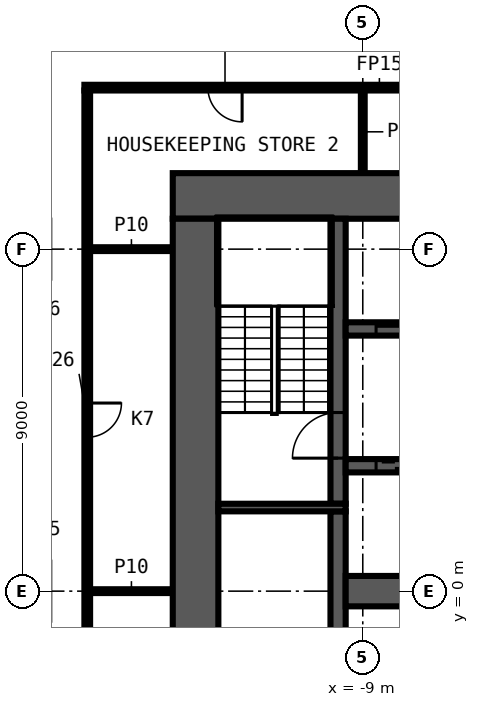
"""IFC4 building model, lengths in metres.
Left out: names, types, materials, properties, quantities, classifications, styles, units other than length and angle.
Written with IfcOpenShell. Run it as: python <this file> out.ifc"""

import sys

from ifc_helpers import new_model, si_unit, direction, frame, frame_2d, origin, place, context, subcontext, project, spatial, rectangle, extrude, element, fill, save


model = new_model("IFC4")
c1 = context("Model", 3, precision=1e-05, world=origin(), true_north=direction((0.0, 1.0)))
c2 = subcontext(c1, "Body", "Model", "MODEL_VIEW")
j1 = project(units=[si_unit("LENGTHUNIT", "METRE"), si_unit("PLANEANGLEUNIT", "RADIAN")], contexts=[c1])
p1 = place(None, origin())
s1 = spatial("IfcSite", under=j1, at=p1, CompositionType="ELEMENT")
p2 = place(p1, origin())
s2 = spatial("IfcBuilding", under=s1, at=p2, CompositionType="ELEMENT")
p3 = place(p2, frame((0.0, 0.0, 44.0)))
s3 = spatial("IfcBuildingStorey", under=s2, at=p3, CompositionType="ELEMENT", Elevation=44.0)
for number, where, z_axis, x_axis in (
    (1, (-16.175, 0.0, 0.0), (0.0, 0.0, 1.0), (1.0, 0.0, 0.0)),
    (2, (-16.175, 9.0, 0.0), (0.0, 0.0, 1.0), (1.0, 0.0, 0.0)),
):
    element("IfcWall", number, at=place(p3, frame(where, z_axis=z_axis, x_axis=x_axis)), inside=s3, PredefinedType="PARTITIONING", context=c2, shape_type="SweptSolid", body=[
        extrude(rectangle(XDim=2.175, YDim=0.1, at=frame_2d((1.087, 0.0))), origin(), (0.0, 0.0, 1.0), 3.3),
    ])
p4 = place(p3, frame((1.425, 13.25, 0.0), z_axis=(0.0, 0.0, 1.0), x_axis=(-1.0, 0.0, 0.0)))
e3 = element("IfcWall", 3, at=p4, inside=s3, PredefinedType="PARTITIONING", context=c2, shape_type="SweptSolid", body=[
    extrude(rectangle(XDim=17.75, YDim=0.15, at=frame_2d((8.875, 0.0))), origin(), (0.0, 0.0, 1.0), 3.3),
])
p5 = place(p4, frame((5.475, 0.0, 0.0)))
e4 = element("IfcOpeningElement", 4, at=p5, cuts=e3, PredefinedType="OPENING", context=c2, shape_type="SweptSolid", body=[
    extrude(rectangle(XDim=0.9, YDim=2.1, at=frame_2d((0.45, 1.05))), frame((0.0, 0.085, 0.0), z_axis=(0.0, -1.0, 0.0), x_axis=(1.0, 0.0, 0.0)), (0.0, 0.0, 1.0), 0.17),
])
p6 = place(p4, frame((13.6, 0.0, 0.0)))
e5 = element("IfcOpeningElement", 5, at=p6, cuts=e3, PredefinedType="OPENING", context=c2, shape_type="SweptSolid", body=[
    extrude(rectangle(XDim=0.9, YDim=2.1, at=frame_2d((0.45, 1.05))), frame((0.0, 0.085, 0.0), z_axis=(0.0, -1.0, 0.0), x_axis=(1.0, 0.0, 0.0)), (0.0, 0.0, 1.0), 0.17),
])
p7 = place(p3, frame((-9.0, 11.0, 0.0), z_axis=(0.0, 0.0, 1.0), x_axis=(0.0, 1.0, 0.0)))
e6 = element("IfcWall", 6, at=p7, inside=s3, PredefinedType="PARTITIONING", context=c2, shape_type="SweptSolid", body=[
    extrude(rectangle(XDim=2.175, YDim=0.1, at=frame_2d((1.087, 0.0))), origin(), (0.0, 0.0, 1.0), 3.3),
])
p8 = place(p3, frame((-16.25, 13.175, 0.0), z_axis=(0.0, 0.0, 1.0), x_axis=(0.0, -1.0, 0.0)))
e7 = element("IfcWall", 7, at=p8, inside=s3, PredefinedType="PARTITIONING", context=c2, shape_type="SweptSolid", body=[
    extrude(rectangle(XDim=26.35, YDim=0.15, at=frame_2d((13.175, 0.0))), origin(), (0.0, 0.0, 1.0), 3.3),
])
p9 = place(p8, frame((17.225, 0.0, 0.0)))
e8 = element("IfcOpeningElement", 8, at=p9, cuts=e7, PredefinedType="OPENING", context=c2, shape_type="SweptSolid", body=[
    extrude(rectangle(XDim=0.9, YDim=2.1, at=frame_2d((0.45, 1.05))), frame((0.0, 0.085, 0.0), z_axis=(0.0, -1.0, 0.0), x_axis=(1.0, 0.0, 0.0)), (0.0, 0.0, 1.0), 0.17),
])
p10 = place(p8, frame((8.225, 0.0, 0.0)))
e9 = element("IfcOpeningElement", 9, at=p10, cuts=e7, PredefinedType="OPENING", context=c2, shape_type="SweptSolid", body=[
    extrude(rectangle(XDim=0.9, YDim=2.1, at=frame_2d((0.45, 1.05))), frame((0.0, 0.085, 0.0), z_axis=(0.0, -1.0, 0.0), x_axis=(1.0, 0.0, 0.0)), (0.0, 0.0, 1.0), 0.17),
])
p11 = place(p3, frame((-14.0, 10.4, 0.0), z_axis=(0.0, 0.0, 1.0), x_axis=(1.0, 0.0, 0.0)))
e10 = element("IfcWall", 10, at=p11, inside=s3, PredefinedType="SHEAR", context=c2, shape_type="SweptSolid", body=[
    extrude(rectangle(XDim=28.0, YDim=1.2, at=frame_2d((14.0, 0.0))), origin(), (0.0, 0.0, 1.0), 3.3),
])
p12 = place(p11, frame((15.9, 0.0, 0.0)))
e11 = element("IfcOpeningElement", 11, at=p12, cuts=e10, PredefinedType="OPENING", context=c2, shape_type="SweptSolid", body=[
    extrude(rectangle(XDim=1.6, YDim=2.1, at=frame_2d((0.8, 1.05))), frame((0.0, 0.61, 0.0), z_axis=(0.0, -1.0, 0.0), x_axis=(1.0, 0.0, 0.0)), (0.0, 0.0, 1.0), 1.22),
])
p13 = place(p3, frame((-13.4, -9.8, 0.0), z_axis=(0.0, 0.0, 1.0), x_axis=(0.0, 1.0, 0.0)))
e12 = element("IfcWall", 12, at=p13, inside=s3, PredefinedType="SHEAR", context=c2, shape_type="SweptSolid", body=[
    extrude(rectangle(XDim=19.6, YDim=1.2, at=frame_2d((9.8, 0.0))), origin(), (0.0, 0.0, 1.0), 3.3),
])
p14 = place(p3, frame((-9.65, -2.1, 0.0), z_axis=(0.0, 0.0, 1.0), x_axis=(0.0, 1.0, 0.0)))
e13 = element("IfcWall", 13, at=p14, inside=s3, PredefinedType="SHEAR", context=c2, shape_type="SweptSolid", body=[
    extrude(rectangle(XDim=4.2, YDim=0.4, at=frame_2d((2.1, 0.0))), origin(), (0.0, 0.0, 1.0), 3.3),
])
p15 = place(p3, frame((-9.65, 2.3, 0.0), z_axis=(0.0, 0.0, 1.0), x_axis=(0.0, 1.0, 0.0)))
e14 = element("IfcWall", 14, at=p15, inside=s3, PredefinedType="SHEAR", context=c2, shape_type="SweptSolid", body=[
    extrude(rectangle(XDim=7.5, YDim=0.4, at=frame_2d((3.75, 0.0))), origin(), (0.0, 0.0, 1.0), 3.3),
])
p16 = place(p15, frame((1.2, 0.0, 0.0)))
e15 = element("IfcOpeningElement", 15, at=p16, cuts=e14, PredefinedType="OPENING", context=c2, shape_type="SweptSolid", body=[
    extrude(rectangle(XDim=1.2, YDim=2.1, at=frame_2d((0.6, 1.05))), frame((0.0, 0.21, 0.0), z_axis=(0.0, -1.0, 0.0), x_axis=(1.0, 0.0, 0.0)), (0.0, 0.0, 1.0), 0.42),
])
p17 = place(p3, frame((-9.45, 2.2, 0.0), z_axis=(0.0, 0.0, 1.0), x_axis=(-1.0, 0.0, 0.0)))
e16 = element("IfcWall", 16, at=p17, inside=s3, PredefinedType="SHEAR", context=c2, shape_type="SweptSolid", body=[
    extrude(rectangle(XDim=3.35, YDim=0.2, at=frame_2d((1.675, 0.0))), origin(), (0.0, 0.0, 1.0), 3.3),
])
p18 = place(p3, frame((-9.45, 6.9, 0.0), z_axis=(0.0, 0.0, 1.0), x_axis=(1.0, 0.0, 0.0)))
e17 = element("IfcWall", 17, at=p18, inside=s3, PredefinedType="SHEAR", context=c2, shape_type="SweptSolid", body=[
    extrude(rectangle(XDim=18.9, YDim=0.35, at=frame_2d((9.45, 0.0))), origin(), (0.0, 0.0, 1.0), 3.3),
])
p19 = place(p18, frame((0.8, 0.0, 0.0)))
e18 = element("IfcOpeningElement", 18, at=p19, cuts=e17, PredefinedType="OPENING", context=c2, shape_type="SweptSolid", body=[
    extrude(rectangle(XDim=1.1, YDim=2.1, at=frame_2d((0.55, 1.05))), frame((0.0, 0.185, 0.0), z_axis=(0.0, -1.0, 0.0), x_axis=(1.0, 0.0, 0.0)), (0.0, 0.0, 1.0), 0.37),
])
p20 = place(p18, frame((3.5, 0.0, 0.0)))
e19 = element("IfcOpeningElement", 19, at=p20, cuts=e17, PredefinedType="OPENING", context=c2, shape_type="SweptSolid", body=[
    extrude(rectangle(XDim=1.1, YDim=2.1, at=frame_2d((0.55, 1.05))), frame((0.0, 0.185, 0.0), z_axis=(0.0, -1.0, 0.0), x_axis=(1.0, 0.0, 0.0)), (0.0, 0.0, 1.0), 0.37),
])
p21 = place(p18, frame((6.2, 0.0, 0.0)))
e20 = element("IfcOpeningElement", 20, at=p21, cuts=e17, PredefinedType="OPENING", context=c2, shape_type="SweptSolid", body=[
    extrude(rectangle(XDim=1.1, YDim=2.1, at=frame_2d((0.55, 1.05))), frame((0.0, 0.185, 0.0), z_axis=(0.0, -1.0, 0.0), x_axis=(1.0, 0.0, 0.0)), (0.0, 0.0, 1.0), 0.37),
])
p22 = place(p18, frame((8.9, 0.0, 0.0)))
e21 = element("IfcOpeningElement", 21, at=p22, cuts=e17, PredefinedType="OPENING", context=c2, shape_type="SweptSolid", body=[
    extrude(rectangle(XDim=1.1, YDim=2.1, at=frame_2d((0.55, 1.05))), frame((0.0, 0.185, 0.0), z_axis=(0.0, -1.0, 0.0), x_axis=(1.0, 0.0, 0.0)), (0.0, 0.0, 1.0), 0.37),
])
p23 = place(p18, frame((11.55, 0.0, 0.0)))
e22 = element("IfcOpeningElement", 22, at=p23, cuts=e17, PredefinedType="OPENING", context=c2, shape_type="SweptSolid", body=[
    extrude(rectangle(XDim=1.2, YDim=2.1, at=frame_2d((0.6, 1.05))), frame((0.0, 0.185, 0.0), z_axis=(0.0, -1.0, 0.0), x_axis=(1.0, 0.0, 0.0)), (0.0, 0.0, 1.0), 0.37),
])
p24 = place(p18, frame((14.3, 0.0, 0.0)))
e23 = element("IfcOpeningElement", 23, at=p24, cuts=e17, PredefinedType="OPENING", context=c2, shape_type="SweptSolid", body=[
    extrude(rectangle(XDim=1.1, YDim=2.1, at=frame_2d((0.55, 1.05))), frame((0.0, 0.185, 0.0), z_axis=(0.0, -1.0, 0.0), x_axis=(1.0, 0.0, 0.0)), (0.0, 0.0, 1.0), 0.37),
])
p25 = place(p18, frame((17.0, 0.0, 0.0)))
e24 = element("IfcOpeningElement", 24, at=p25, cuts=e17, PredefinedType="OPENING", context=c2, shape_type="SweptSolid", body=[
    extrude(rectangle(XDim=1.1, YDim=2.1, at=frame_2d((0.55, 1.05))), frame((0.0, 0.185, 0.0), z_axis=(0.0, -1.0, 0.0), x_axis=(1.0, 0.0, 0.0)), (0.0, 0.0, 1.0), 0.37),
])
p26 = place(p3, frame((9.45, 3.3, 0.0), z_axis=(0.0, 0.0, 1.0), x_axis=(-1.0, 0.0, 0.0)))
e25 = element("IfcWall", 25, at=p26, inside=s3, PredefinedType="SHEAR", context=c2, shape_type="SweptSolid", body=[
    extrude(rectangle(XDim=18.9, YDim=0.35, at=frame_2d((9.45, 0.0))), origin(), (0.0, 0.0, 1.0), 3.3),
])
p27 = place(p26, frame((17.0, 0.0, 0.0)))
e26 = element("IfcOpeningElement", 26, at=p27, cuts=e25, PredefinedType="OPENING", context=c2, shape_type="SweptSolid", body=[
    extrude(rectangle(XDim=1.1, YDim=2.1, at=frame_2d((0.55, 1.05))), frame((0.0, 0.185, 0.0), z_axis=(0.0, -1.0, 0.0), x_axis=(1.0, 0.0, 0.0)), (0.0, 0.0, 1.0), 0.37),
])
p28 = place(p26, frame((14.3, 0.0, 0.0)))
e27 = element("IfcOpeningElement", 27, at=p28, cuts=e25, PredefinedType="OPENING", context=c2, shape_type="SweptSolid", body=[
    extrude(rectangle(XDim=1.1, YDim=2.1, at=frame_2d((0.55, 1.05))), frame((0.0, 0.185, 0.0), z_axis=(0.0, -1.0, 0.0), x_axis=(1.0, 0.0, 0.0)), (0.0, 0.0, 1.0), 0.37),
])
p29 = place(p26, frame((11.6, 0.0, 0.0)))
e28 = element("IfcOpeningElement", 28, at=p29, cuts=e25, PredefinedType="OPENING", context=c2, shape_type="SweptSolid", body=[
    extrude(rectangle(XDim=1.1, YDim=2.1, at=frame_2d((0.55, 1.05))), frame((0.0, 0.185, 0.0), z_axis=(0.0, -1.0, 0.0), x_axis=(1.0, 0.0, 0.0)), (0.0, 0.0, 1.0), 0.37),
])
p30 = place(p26, frame((8.9, 0.0, 0.0)))
e29 = element("IfcOpeningElement", 29, at=p30, cuts=e25, PredefinedType="OPENING", context=c2, shape_type="SweptSolid", body=[
    extrude(rectangle(XDim=1.1, YDim=2.1, at=frame_2d((0.55, 1.05))), frame((0.0, 0.185, 0.0), z_axis=(0.0, -1.0, 0.0), x_axis=(1.0, 0.0, 0.0)), (0.0, 0.0, 1.0), 0.37),
])
p31 = place(p26, frame((6.2, 0.0, 0.0)))
e30 = element("IfcOpeningElement", 30, at=p31, cuts=e25, PredefinedType="OPENING", context=c2, shape_type="SweptSolid", body=[
    extrude(rectangle(XDim=1.1, YDim=2.1, at=frame_2d((0.55, 1.05))), frame((0.0, 0.185, 0.0), z_axis=(0.0, -1.0, 0.0), x_axis=(1.0, 0.0, 0.0)), (0.0, 0.0, 1.0), 0.37),
])
p32 = place(p26, frame((3.5, 0.0, 0.0)))
e31 = element("IfcOpeningElement", 31, at=p32, cuts=e25, PredefinedType="OPENING", context=c2, shape_type="SweptSolid", body=[
    extrude(rectangle(XDim=1.1, YDim=2.1, at=frame_2d((0.55, 1.05))), frame((0.0, 0.185, 0.0), z_axis=(0.0, -1.0, 0.0), x_axis=(1.0, 0.0, 0.0)), (0.0, 0.0, 1.0), 0.37),
])
p33 = place(p26, frame((0.9, 0.0, 0.0)))
e32 = element("IfcOpeningElement", 32, at=p33, cuts=e25, PredefinedType="OPENING", context=c2, shape_type="SweptSolid", body=[
    extrude(rectangle(XDim=0.9, YDim=2.1, at=frame_2d((0.45, 1.05))), frame((0.0, 0.185, 0.0), z_axis=(0.0, -1.0, 0.0), x_axis=(1.0, 0.0, 0.0)), (0.0, 0.0, 1.0), 0.37),
])
p34 = place(p3, frame((-9.45, 0.0, 0.0), z_axis=(0.0, 0.0, 1.0), x_axis=(1.0, 0.0, 0.0)))
e33 = element("IfcWall", 33, at=p34, inside=s3, PredefinedType="SHEAR", context=c2, shape_type="SweptSolid", body=[
    extrude(rectangle(XDim=18.9, YDim=0.8, at=frame_2d((9.45, 0.0))), origin(), (0.0, 0.0, 1.0), 3.3),
])
p35 = place(p6, origin())
e34 = element("IfcDoor", 34, at=p35, inside=s3, OperationType="SINGLE_SWING_LEFT", PredefinedType="DOOR", context=c2, shape_type="SweptSolid", body=[
    extrude(rectangle(XDim=0.9, YDim=2.1, at=frame_2d((0.45, 1.05))), frame((0.0, 0.025, 0.0), z_axis=(0.0, -1.0, 0.0), x_axis=(1.0, 0.0, 0.0)), (0.0, 0.0, 1.0), 0.05),
])
fill(e5, e34)
p36 = place(p10, origin())
e35 = element("IfcDoor", 35, at=p36, inside=s3, OperationType="SINGLE_SWING_RIGHT", PredefinedType="DOOR", context=c2, shape_type="SweptSolid", body=[
    extrude(rectangle(XDim=0.9, YDim=2.1, at=frame_2d((0.45, 1.05))), frame((0.0, 0.025, 0.0), z_axis=(0.0, -1.0, 0.0), x_axis=(1.0, 0.0, 0.0)), (0.0, 0.0, 1.0), 0.05),
])
fill(e9, e35)
p37 = place(p19, origin())
e36 = element("IfcDoor", 36, at=p37, inside=s3, OperationType="DOUBLE_DOOR_SLIDING", PredefinedType="DOOR", context=c2, shape_type="SweptSolid", body=[
    extrude(rectangle(XDim=1.1, YDim=2.1, at=frame_2d((0.55, 1.05))), frame((0.0, 0.025, 0.0), z_axis=(0.0, -1.0, 0.0), x_axis=(1.0, 0.0, 0.0)), (0.0, 0.0, 1.0), 0.05),
])
fill(e18, e36)
p38 = place(p27, origin())
e37 = element("IfcDoor", 37, at=p38, inside=s3, OperationType="DOUBLE_DOOR_SLIDING", PredefinedType="DOOR", context=c2, shape_type="SweptSolid", body=[
    extrude(rectangle(XDim=1.1, YDim=2.1, at=frame_2d((0.55, 1.05))), frame((0.0, 0.025, 0.0), z_axis=(0.0, -1.0, 0.0), x_axis=(1.0, 0.0, 0.0)), (0.0, 0.0, 1.0), 0.05),
])
fill(e26, e37)
p39 = place(p16, origin())
e38 = element("IfcDoor", 38, at=p39, inside=s3, OperationType="SINGLE_SWING_RIGHT", PredefinedType="DOOR", context=c2, shape_type="SweptSolid", body=[
    extrude(rectangle(XDim=1.2, YDim=2.1, at=frame_2d((0.6, 1.05))), frame((0.0, 0.025, 0.0), z_axis=(0.0, -1.0, 0.0), x_axis=(1.0, 0.0, 0.0)), (0.0, 0.0, 1.0), 0.05),
])
fill(e15, e38)
save(model, sys.argv[1])
